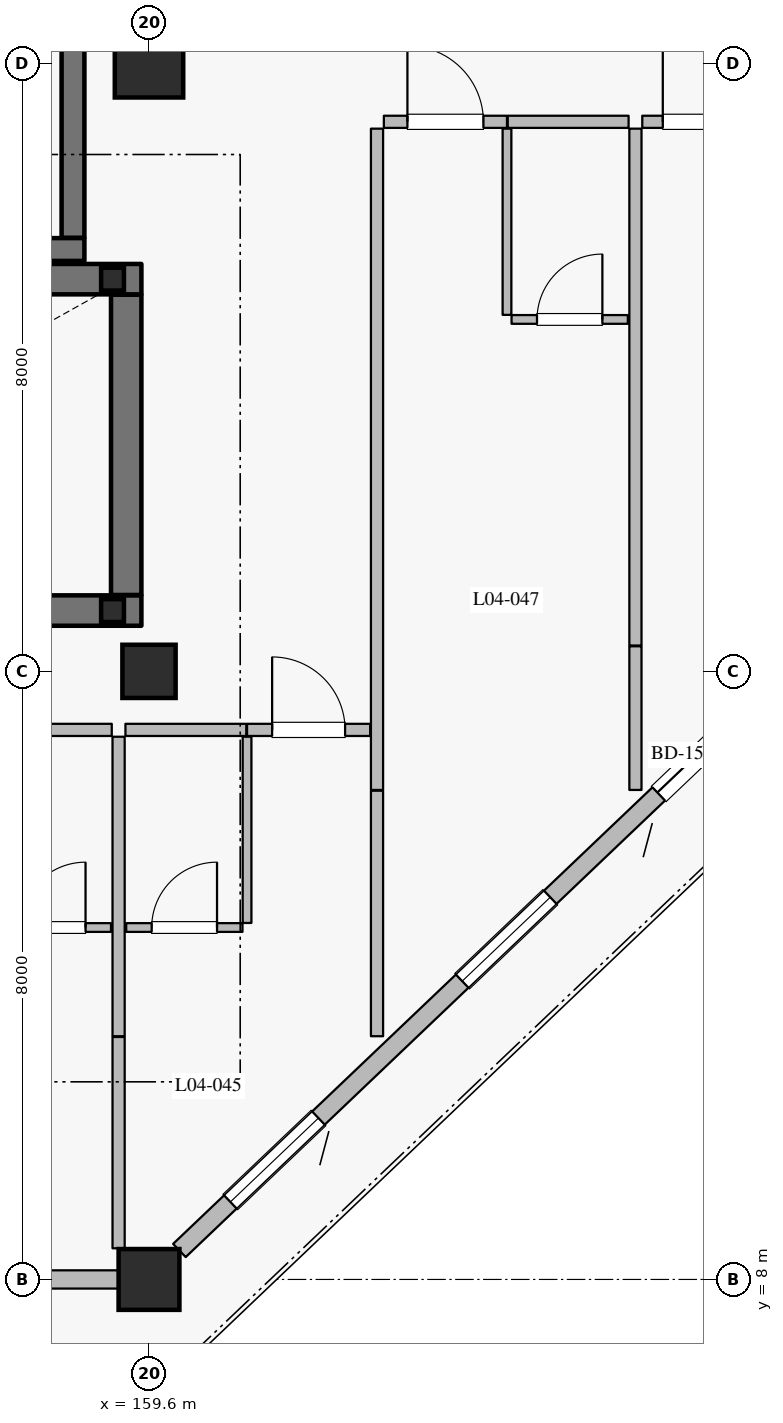
"""IFC4 building model, lengths in metres.
Left out: names, types, materials, properties, quantities, classifications, styles, units other than length and angle.
Written with IfcOpenShell. Run it as: python <this file> out.ifc"""

import sys

from ifc_helpers import new_model, si_unit, direction, frame, frame_2d, origin, origin_2d, place, context, subcontext, project, spatial, rectangle, hollow_rectangle, extrude, element, fill, save


model = new_model("IFC4")
c1 = context("Model", 3, precision=1e-05, world=origin(), true_north=direction((0.0, 1.0)))
c2 = subcontext(c1, "Body", "Model", "MODEL_VIEW")
j1 = project(units=[si_unit("LENGTHUNIT", "METRE"), si_unit("PLANEANGLEUNIT", "RADIAN")], contexts=[c1])
p1 = place(None, origin())
s1 = spatial("IfcSite", under=j1, at=p1, CompositionType="ELEMENT")
p2 = place(p1, origin())
s2 = spatial("IfcBuilding", under=s1, at=p2, CompositionType="ELEMENT")
p3 = place(p2, frame((0.0, 0.0, 21.0)))
s3 = spatial("IfcBuildingStorey", under=s2, at=p3, CompositionType="ELEMENT", Elevation=21.0)
p4 = place(p3, frame((159.6, 8.0, 0.0), z_axis=(0.0, 0.0, 1.0), x_axis=(1.0, 0.0, 0.0)))
e1 = element("IfcColumn", 1, at=p4, inside=s3, PredefinedType="COLUMN", context=c2, shape_type="SweptSolid", body=[
    extrude(rectangle(XDim=0.8, YDim=0.8, at=origin_2d()), origin(), (0.0, 0.0, 1.0), 4.2),
])
p5 = place(p3, frame((159.6, 24.0, 0.0), z_axis=(0.0, 0.0, 1.0), x_axis=(1.0, 0.0, 0.0)))
e2 = element("IfcColumn", 2, at=p5, inside=s3, PredefinedType="COLUMN", context=c2, shape_type="SweptSolid", body=[
    extrude(rectangle(XDim=0.9, YDim=0.9, at=origin_2d()), origin(), (0.0, 0.0, 1.0), 4.2),
])
p6 = place(p3, frame((159.6, 16.0, 0.0), z_axis=(0.0, 0.0, 1.0), x_axis=(1.0, 0.0, 0.0)))
e3 = element("IfcColumn", 3, at=p6, inside=s3, PredefinedType="COLUMN", context=c2, shape_type="SweptSolid", body=[
    extrude(rectangle(XDim=0.7, YDim=0.7, at=origin_2d()), origin(), (0.0, 0.0, 1.0), 4.2),
])
p7 = place(p3, frame((159.2, 8.0, 0.0), z_axis=(0.0, 0.0, 1.0), x_axis=(-1.0, 0.0, 0.0)))
e4 = element("IfcWall", 4, at=p7, inside=s3, PredefinedType="SOLIDWALL", context=c2, shape_type="SweptSolid", body=[
    extrude(rectangle(XDim=7.6, YDim=0.24, at=frame_2d((3.8, 0.0))), origin(), (0.0, 0.0, 1.0), 3.53),
])
p8 = place(p7, frame((0.95, 0.0, 0.0)))
e5 = element("IfcOpeningElement", 5, at=p8, cuts=e4, PredefinedType="OPENING", context=c2, shape_type="SweptSolid", body=[
    extrude(rectangle(XDim=1.5, YDim=2.25, at=frame_2d((0.75, 1.125))), frame((0.0, 0.13, 0.0), z_axis=(0.0, -1.0, 0.0), x_axis=(1.0, 0.0, 0.0)), (0.0, 0.0, 1.0), 0.26),
])
p9 = place(p7, frame((4.3, 0.0, 0.8)))
e6 = element("IfcOpeningElement", 6, at=p9, cuts=e4, PredefinedType="OPENING", context=c2, shape_type="SweptSolid", body=[
    extrude(rectangle(XDim=1.6, YDim=1.6, at=frame_2d((0.8, 0.8))), frame((0.0, 0.13, 0.0), z_axis=(0.0, -1.0, 0.0), x_axis=(1.0, 0.0, 0.0)), (0.0, 0.0, 1.0), 0.26),
])
p10 = place(p3, frame((167.6, 15.619, 0.0), z_axis=(0.0, 0.0, 1.0), x_axis=(-0.724156739794, -0.689635422677, 0.0)))
e7 = element("IfcWall", 7, at=p10, inside=s3, PredefinedType="SOLIDWALL", context=c2, shape_type="SweptSolid", body=[
    extrude(rectangle(XDim=10.495, YDim=0.24, at=frame_2d((5.248, 0.0))), origin(), (0.0, 0.0, 1.0), 3.53),
])
p11 = place(p10, frame((0.286, 0.0, 0.0)))
e8 = element("IfcOpeningElement", 8, at=p11, cuts=e7, PredefinedType="OPENING", context=c2, shape_type="SweptSolid", body=[
    extrude(rectangle(XDim=1.5, YDim=2.25, at=frame_2d((0.75, 1.125))), frame((0.0, 0.13, 0.0), z_axis=(0.0, -1.0, 0.0), x_axis=(1.0, 0.0, 0.0)), (0.0, 0.0, 1.0), 0.26),
])
p12 = place(p10, frame((3.757, 0.0, 0.8)))
e9 = element("IfcOpeningElement", 9, at=p12, cuts=e7, PredefinedType="OPENING", context=c2, shape_type="SweptSolid", body=[
    extrude(rectangle(XDim=1.6, YDim=1.6, at=frame_2d((0.8, 0.8))), frame((0.0, 0.13, 0.0), z_axis=(0.0, -1.0, 0.0), x_axis=(1.0, 0.0, 0.0)), (0.0, 0.0, 1.0), 0.26),
])
p13 = place(p10, frame((7.969, 0.0, 0.8)))
e10 = element("IfcOpeningElement", 10, at=p13, cuts=e7, PredefinedType="OPENING", context=c2, shape_type="SweptSolid", body=[
    extrude(rectangle(XDim=1.6, YDim=1.6, at=frame_2d((0.8, 0.8))), frame((0.0, 0.13, 0.0), z_axis=(0.0, -1.0, 0.0), x_axis=(1.0, 0.0, 0.0)), (0.0, 0.0, 1.0), 0.26),
])
p14 = place(p3, frame((155.25, 21.55, 0.0), z_axis=(0.0, 0.0, 1.0), x_axis=(1.0, 0.0, 0.0)))
e11 = element("IfcWall", 11, at=p14, inside=s3, PredefinedType="SHEAR", context=c2, shape_type="SweptSolid", body=[
    extrude(rectangle(XDim=3.5, YDim=0.3, at=frame_2d((1.75, 0.0))), origin(), (0.0, 0.0, 1.0), 3.965),
])
p15 = place(p3, frame((158.6, 21.705, 0.0), z_axis=(0.0, 0.0, 1.0), x_axis=(0.0, 1.0, 0.0)))
e12 = element("IfcWall", 12, at=p15, inside=s3, PredefinedType="SHEAR", context=c2, shape_type="SweptSolid", body=[
    extrude(rectangle(XDim=2.59, YDim=0.3, at=frame_2d((1.295, 0.0))), origin(), (0.0, 0.0, 1.0), 3.965),
])
p16 = place(p3, frame((151.3, 16.8, 0.0), z_axis=(0.0, 0.0, 1.0), x_axis=(1.0, 0.0, 0.0)))
e13 = element("IfcWall", 13, at=p16, inside=s3, PredefinedType="SHEAR", context=c2, shape_type="SweptSolid", body=[
    extrude(rectangle(XDim=8.2, YDim=0.4, at=frame_2d((4.1, 0.0))), origin(), (0.0, 0.0, 1.0), 3.965),
])
p17 = place(p3, frame((159.3, 17.005, 0.0), z_axis=(0.0, 0.0, 1.0), x_axis=(0.0, 1.0, 0.0)))
e14 = element("IfcWall", 14, at=p17, inside=s3, PredefinedType="SHEAR", context=c2, shape_type="SweptSolid", body=[
    extrude(rectangle(XDim=3.95, YDim=0.4, at=frame_2d((1.975, 0.0))), origin(), (0.0, 0.0, 1.0), 3.965),
])
p18 = place(p3, frame((151.3, 21.16, 0.0), z_axis=(0.0, 0.0, 1.0), x_axis=(1.0, 0.0, 0.0)))
e15 = element("IfcWall", 15, at=p18, inside=s3, PredefinedType="SHEAR", context=c2, shape_type="SweptSolid", body=[
    extrude(rectangle(XDim=8.2, YDim=0.4, at=frame_2d((4.1, 0.0))), origin(), (0.0, 0.0, 1.0), 3.965),
])
p19 = place(p18, frame((0.43, 0.0, 0.0)))
e16 = element("IfcOpeningElement", 16, at=p19, cuts=e15, PredefinedType="OPENING", context=c2, shape_type="SweptSolid", body=[
    extrude(rectangle(XDim=1.16, YDim=2.2, at=frame_2d((0.58, 1.1))), frame((0.0, 0.21, 0.0), z_axis=(0.0, -1.0, 0.0), x_axis=(1.0, 0.0, 0.0)), (0.0, 0.0, 1.0), 0.42),
])
for number, where, z_axis, x_axis in (
    (17, (159.12, 16.8, -2.4), (0.0, 0.0, 1.0), (1.0, 0.0, 0.0)),
    (18, (159.12, 21.16, -2.4), (0.0, 0.0, 1.0), (1.0, 0.0, 0.0)),
):
    element("IfcColumn", number, at=place(p3, frame(where, z_axis=z_axis, x_axis=x_axis)), inside=s3, PredefinedType="COLUMN", context=c2, shape_type="SweptSolid", body=[
        extrude(hollow_rectangle(XDim=0.3, YDim=0.3, WallThickness=0.012, at=origin_2d()), origin(), (0.0, 0.0, 1.0), 4.32),
    ])
p20 = place(p3, frame((157.52, 15.23, 0.0), z_axis=(0.0, 0.0, 1.0), x_axis=(1.0, 0.0, 0.0)))
e19 = element("IfcWall", 19, at=p20, inside=s3, PredefinedType="PARTITIONING", context=c2, shape_type="SweptSolid", body=[
    extrude(rectangle(XDim=1.59, YDim=0.16, at=frame_2d((0.795, 0.0))), origin(), (0.0, 0.0, 1.0), 3.965),
])
p21 = place(p3, frame((157.57, 12.63, 0.0), z_axis=(0.0, 0.0, 1.0), x_axis=(1.0, 0.0, 0.0)))
e20 = element("IfcWall", 20, at=p21, inside=s3, PredefinedType="PARTITIONING", context=c2, shape_type="SweptSolid", body=[
    extrude(rectangle(XDim=1.53, YDim=0.115, at=frame_2d((0.765, 0.0))), origin(), (0.0, 0.0, 1.0), 3.965),
])
p22 = place(p21, frame((0.335, 0.0, 0.0)))
e21 = element("IfcOpeningElement", 21, at=p22, cuts=e20, PredefinedType="OPENING", context=c2, shape_type="SweptSolid", body=[
    extrude(rectangle(XDim=0.86, YDim=2.12, at=frame_2d((0.43, 1.06))), frame((0.0, 0.067, 0.0), z_axis=(0.0, -1.0, 0.0), x_axis=(1.0, 0.0, 0.0)), (0.0, 0.0, 1.0), 0.135),
])
p23 = place(p3, frame((159.2, 8.41, 0.0), z_axis=(0.0, 0.0, 1.0), x_axis=(0.0, 1.0, 0.0)))
e22 = element("IfcWall", 22, at=p23, inside=s3, PredefinedType="PARTITIONING", context=c2, shape_type="SweptSolid", body=[
    extrude(rectangle(XDim=2.78, YDim=0.16, at=frame_2d((1.39, 0.0))), origin(), (0.0, 0.0, 1.0), 3.965),
])
p24 = place(p3, frame((159.29, 15.23, 0.0), z_axis=(0.0, 0.0, 1.0), x_axis=(1.0, 0.0, 0.0)))
e23 = element("IfcWall", 23, at=p24, inside=s3, PredefinedType="PARTITIONING", context=c2, shape_type="SweptSolid", body=[
    extrude(rectangle(XDim=1.59, YDim=0.16, at=frame_2d((0.795, 0.0))), origin(), (0.0, 0.0, 1.0), 3.965),
])
p25 = place(p3, frame((160.89, 15.23, 0.0), z_axis=(0.0, 0.0, 1.0), x_axis=(1.0, 0.0, 0.0)))
e24 = element("IfcWall", 24, at=p25, inside=s3, PredefinedType="PARTITIONING", context=c2, shape_type="SweptSolid", body=[
    extrude(rectangle(XDim=1.62, YDim=0.16, at=frame_2d((0.81, 0.0))), origin(), (0.0, 0.0, 1.0), 3.965),
])
p26 = place(p25, frame((0.33, 0.0, 0.0)))
e25 = element("IfcOpeningElement", 25, at=p26, cuts=e24, PredefinedType="OPENING", context=c2, shape_type="SweptSolid", body=[
    extrude(rectangle(XDim=0.96, YDim=2.2, at=frame_2d((0.48, 1.1))), frame((0.0, 0.09, 0.0), z_axis=(0.0, -1.0, 0.0), x_axis=(1.0, 0.0, 0.0)), (0.0, 0.0, 1.0), 0.18),
])
p27 = place(p3, frame((160.89, 12.69, 0.0), z_axis=(0.0, 0.0, 1.0), x_axis=(0.0, 1.0, 0.0)))
e26 = element("IfcWall", 26, at=p27, inside=s3, PredefinedType="PARTITIONING", context=c2, shape_type="SweptSolid", body=[
    extrude(rectangle(XDim=2.45, YDim=0.115, at=frame_2d((1.225, 0.0))), origin(), (0.0, 0.0, 1.0), 3.965),
])
p28 = place(p3, frame((159.3, 12.63, 0.0), z_axis=(0.0, 0.0, 1.0), x_axis=(1.0, 0.0, 0.0)))
e27 = element("IfcWall", 27, at=p28, inside=s3, PredefinedType="PARTITIONING", context=c2, shape_type="SweptSolid", body=[
    extrude(rectangle(XDim=1.53, YDim=0.115, at=frame_2d((0.765, 0.0))), origin(), (0.0, 0.0, 1.0), 3.965),
])
p29 = place(p28, frame((0.335, 0.0, 0.0)))
e28 = element("IfcOpeningElement", 28, at=p29, cuts=e27, PredefinedType="OPENING", context=c2, shape_type="SweptSolid", body=[
    extrude(rectangle(XDim=0.86, YDim=2.12, at=frame_2d((0.43, 1.06))), frame((0.0, 0.067, 0.0), z_axis=(0.0, -1.0, 0.0), x_axis=(1.0, 0.0, 0.0)), (0.0, 0.0, 1.0), 0.135),
])
p30 = place(p3, frame((159.2, 11.2, 0.0), z_axis=(0.0, 0.0, 1.0), x_axis=(0.0, 1.0, 0.0)))
e29 = element("IfcWall", 29, at=p30, inside=s3, PredefinedType="PARTITIONING", context=c2, shape_type="SweptSolid", body=[
    extrude(rectangle(XDim=3.94, YDim=0.16, at=frame_2d((1.97, 0.0))), origin(), (0.0, 0.0, 1.0), 3.965),
])
p31 = place(p3, frame((162.6, 11.2, 0.0), z_axis=(0.0, 0.0, 1.0), x_axis=(0.0, 1.0, 0.0)))
e30 = element("IfcWall", 30, at=p31, inside=s3, PredefinedType="PARTITIONING", context=c2, shape_type="SweptSolid", body=[
    extrude(rectangle(XDim=3.23, YDim=0.16, at=frame_2d((1.615, 0.0))), origin(), (0.0, 0.0, 1.0), 3.965),
])
p32 = place(p3, frame((162.69, 23.23, 0.0), z_axis=(0.0, 0.0, 1.0), x_axis=(1.0, 0.0, 0.0)))
e31 = element("IfcWall", 31, at=p32, inside=s3, PredefinedType="PARTITIONING", context=c2, shape_type="SweptSolid", body=[
    extrude(rectangle(XDim=1.62, YDim=0.16, at=frame_2d((0.81, 0.0))), origin(), (0.0, 0.0, 1.0), 3.965),
])
p33 = place(p32, frame((0.31, 0.0, 0.0)))
e32 = element("IfcOpeningElement", 32, at=p33, cuts=e31, PredefinedType="OPENING", context=c2, shape_type="SweptSolid", body=[
    extrude(rectangle(XDim=1.0, YDim=2.25, at=frame_2d((0.5, 1.125))), frame((0.0, 0.09, 0.0), z_axis=(0.0, -1.0, 0.0), x_axis=(1.0, 0.0, 0.0)), (0.0, 0.0, 1.0), 0.18),
])
p34 = place(p3, frame((164.32, 23.23, 0.0), z_axis=(0.0, 0.0, 1.0), x_axis=(1.0, 0.0, 0.0)))
e33 = element("IfcWall", 33, at=p34, inside=s3, PredefinedType="PARTITIONING", context=c2, shape_type="SweptSolid", body=[
    extrude(rectangle(XDim=1.59, YDim=0.16, at=frame_2d((0.795, 0.0))), origin(), (0.0, 0.0, 1.0), 3.965),
])
p35 = place(p3, frame((164.31, 20.69, 0.0), z_axis=(0.0, 0.0, 1.0), x_axis=(0.0, 1.0, 0.0)))
e34 = element("IfcWall", 34, at=p35, inside=s3, PredefinedType="PARTITIONING", context=c2, shape_type="SweptSolid", body=[
    extrude(rectangle(XDim=2.45, YDim=0.115, at=frame_2d((1.225, 0.0))), origin(), (0.0, 0.0, 1.0), 3.965),
])
p36 = place(p3, frame((164.37, 20.63, 0.0), z_axis=(0.0, 0.0, 1.0), x_axis=(1.0, 0.0, 0.0)))
e35 = element("IfcWall", 35, at=p36, inside=s3, PredefinedType="PARTITIONING", context=c2, shape_type="SweptSolid", body=[
    extrude(rectangle(XDim=1.53, YDim=0.115, at=frame_2d((0.765, 0.0))), origin(), (0.0, 0.0, 1.0), 3.965),
])
p37 = place(p36, frame((0.335, 0.0, 0.0)))
e36 = element("IfcOpeningElement", 36, at=p37, cuts=e35, PredefinedType="OPENING", context=c2, shape_type="SweptSolid", body=[
    extrude(rectangle(XDim=0.86, YDim=2.12, at=frame_2d((0.43, 1.06))), frame((0.0, 0.067, 0.0), z_axis=(0.0, -1.0, 0.0), x_axis=(1.0, 0.0, 0.0)), (0.0, 0.0, 1.0), 0.135),
])
p38 = place(p3, frame((162.6, 14.44, 0.0), z_axis=(0.0, 0.0, 1.0), x_axis=(0.0, 1.0, 0.0)))
e37 = element("IfcWall", 37, at=p38, inside=s3, PredefinedType="PARTITIONING", context=c2, shape_type="SweptSolid", body=[
    extrude(rectangle(XDim=8.7, YDim=0.16, at=frame_2d((4.35, 0.0))), origin(), (0.0, 0.0, 1.0), 3.965),
])
p39 = place(p3, frame((166.0, 14.44, 0.0), z_axis=(0.0, 0.0, 1.0), x_axis=(0.0, 1.0, 0.0)))
e38 = element("IfcWall", 38, at=p39, inside=s3, PredefinedType="PARTITIONING", context=c2, shape_type="SweptSolid", body=[
    extrude(rectangle(XDim=1.89, YDim=0.16, at=frame_2d((0.945, 0.0))), origin(), (0.0, 0.0, 1.0), 3.965),
])
p40 = place(p3, frame((166.09, 23.23, 0.0), z_axis=(0.0, 0.0, 1.0), x_axis=(1.0, 0.0, 0.0)))
e39 = element("IfcWall", 39, at=p40, inside=s3, PredefinedType="PARTITIONING", context=c2, shape_type="SweptSolid", body=[
    extrude(rectangle(XDim=1.62, YDim=0.16, at=frame_2d((0.81, 0.0))), origin(), (0.0, 0.0, 1.0), 3.965),
])
p41 = place(p40, frame((0.27, 0.0, 0.0)))
e40 = element("IfcOpeningElement", 40, at=p41, cuts=e39, PredefinedType="OPENING", context=c2, shape_type="SweptSolid", body=[
    extrude(rectangle(XDim=1.08, YDim=2.3, at=frame_2d((0.54, 1.15))), frame((0.0, 0.09, 0.0), z_axis=(0.0, -1.0, 0.0), x_axis=(1.0, 0.0, 0.0)), (0.0, 0.0, 1.0), 0.18),
])
p42 = place(p3, frame((166.0, 16.34, 0.0), z_axis=(0.0, 0.0, 1.0), x_axis=(0.0, 1.0, 0.0)))
e41 = element("IfcWall", 41, at=p42, inside=s3, PredefinedType="PARTITIONING", context=c2, shape_type="SweptSolid", body=[
    extrude(rectangle(XDim=6.8, YDim=0.16, at=frame_2d((3.4, 0.0))), origin(), (0.0, 0.0, 1.0), 3.965),
])
p43 = place(p11, origin())
e42 = element("IfcDoor", 42, at=p43, inside=s3, OperationType="SLIDING_TO_LEFT", PredefinedType="DOOR", context=c2, shape_type="SweptSolid", body=[
    extrude(rectangle(XDim=1.5, YDim=2.25, at=frame_2d((0.75, 1.125))), frame((0.0, 0.025, 0.0), z_axis=(0.0, -1.0, 0.0), x_axis=(1.0, 0.0, 0.0)), (0.0, 0.0, 1.0), 0.05),
])
fill(e8, e42)
p44 = place(p12, origin())
e43 = element("IfcWindow", 43, at=p44, inside=s3, PartitioningType="SINGLE_PANEL", PredefinedType="WINDOW", context=c2, shape_type="SweptSolid", body=[
    extrude(rectangle(XDim=1.6, YDim=1.6, at=frame_2d((0.8, 0.8))), frame((0.0, 0.03, 0.0), z_axis=(0.0, -1.0, 0.0), x_axis=(1.0, 0.0, 0.0)), (0.0, 0.0, 1.0), 0.06),
])
fill(e9, e43)
p45 = place(p13, origin())
e44 = element("IfcWindow", 44, at=p45, inside=s3, PartitioningType="SINGLE_PANEL", PredefinedType="WINDOW", context=c2, shape_type="SweptSolid", body=[
    extrude(rectangle(XDim=1.6, YDim=1.6, at=frame_2d((0.8, 0.8))), frame((0.0, 0.03, 0.0), z_axis=(0.0, -1.0, 0.0), x_axis=(1.0, 0.0, 0.0)), (0.0, 0.0, 1.0), 0.06),
])
fill(e10, e44)
p46 = place(p22, origin())
e45 = element("IfcDoor", 45, at=p46, inside=s3, OperationType="SINGLE_SWING_RIGHT", PredefinedType="DOOR", context=c2, shape_type="SweptSolid", body=[
    extrude(rectangle(XDim=0.86, YDim=2.12, at=frame_2d((0.43, 1.06))), frame((0.0, 0.025, 0.0), z_axis=(0.0, -1.0, 0.0), x_axis=(1.0, 0.0, 0.0)), (0.0, 0.0, 1.0), 0.05),
])
fill(e21, e45)
p47 = place(p26, origin())
e46 = element("IfcDoor", 46, at=p47, inside=s3, OperationType="SINGLE_SWING_LEFT", PredefinedType="DOOR", context=c2, shape_type="SweptSolid", body=[
    extrude(rectangle(XDim=0.96, YDim=2.2, at=frame_2d((0.48, 1.1))), frame((0.0, 0.025, 0.0), z_axis=(0.0, -1.0, 0.0), x_axis=(1.0, 0.0, 0.0)), (0.0, 0.0, 1.0), 0.05),
])
fill(e25, e46)
p48 = place(p29, origin())
e47 = element("IfcDoor", 47, at=p48, inside=s3, OperationType="SINGLE_SWING_RIGHT", PredefinedType="DOOR", context=c2, shape_type="SweptSolid", body=[
    extrude(rectangle(XDim=0.86, YDim=2.12, at=frame_2d((0.43, 1.06))), frame((0.0, 0.025, 0.0), z_axis=(0.0, -1.0, 0.0), x_axis=(1.0, 0.0, 0.0)), (0.0, 0.0, 1.0), 0.05),
])
fill(e28, e47)
p49 = place(p33, origin())
e48 = element("IfcDoor", 48, at=p49, inside=s3, OperationType="SINGLE_SWING_LEFT", PredefinedType="DOOR", context=c2, shape_type="SweptSolid", body=[
    extrude(rectangle(XDim=1.0, YDim=2.25, at=frame_2d((0.5, 1.125))), frame((0.0, 0.025, 0.0), z_axis=(0.0, -1.0, 0.0), x_axis=(1.0, 0.0, 0.0)), (0.0, 0.0, 1.0), 0.05),
])
fill(e32, e48)
p50 = place(p37, origin())
e49 = element("IfcDoor", 49, at=p50, inside=s3, OperationType="SINGLE_SWING_RIGHT", PredefinedType="DOOR", context=c2, shape_type="SweptSolid", body=[
    extrude(rectangle(XDim=0.86, YDim=2.12, at=frame_2d((0.43, 1.06))), frame((0.0, 0.025, 0.0), z_axis=(0.0, -1.0, 0.0), x_axis=(1.0, 0.0, 0.0)), (0.0, 0.0, 1.0), 0.05),
])
fill(e36, e49)
p51 = place(p41, origin())
e50 = element("IfcDoor", 50, at=p51, inside=s3, OperationType="SINGLE_SWING_LEFT", PredefinedType="DOOR", context=c2, shape_type="SweptSolid", body=[
    extrude(rectangle(XDim=1.08, YDim=2.3, at=frame_2d((0.54, 1.15))), frame((0.0, 0.025, 0.0), z_axis=(0.0, -1.0, 0.0), x_axis=(1.0, 0.0, 0.0)), (0.0, 0.0, 1.0), 0.05),
])
fill(e40, e50)
save(model, sys.argv[1])
